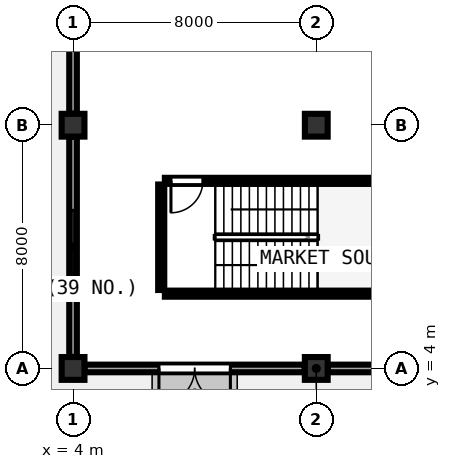
"""IFC4 building model, lengths in metres.
Left out: names, types, materials, properties, quantities, classifications, styles, units other than length and angle.
Written with IfcOpenShell. Run it as: python <this file> out.ifc"""

import sys

from ifc_helpers import new_model, si_unit, direction, frame, frame_2d, origin, origin_2d, place, context, subcontext, project, spatial, rectangle, extrude, element, fill, save


model = new_model("IFC4")
c1 = context("Model", 3, precision=1e-05, world=origin(), true_north=direction((0.0, 1.0)))
c2 = subcontext(c1, "Body", "Model", "MODEL_VIEW")
j1 = project(units=[si_unit("LENGTHUNIT", "METRE"), si_unit("PLANEANGLEUNIT", "RADIAN")], contexts=[c1])
p1 = place(None, origin())
s1 = spatial("IfcSite", under=j1, at=p1, CompositionType="ELEMENT")
p2 = place(p1, origin())
s2 = spatial("IfcBuilding", under=s1, at=p2, CompositionType="ELEMENT")
p3 = place(p2, origin())
s3 = spatial("IfcBuildingStorey", under=s2, at=p3, CompositionType="ELEMENT", Elevation=0.0)
for number, where, z_axis, x_axis in (
    (1, (4.0, 4.0, 0.0), (0.0, 0.0, 1.0), (1.0, 0.0, 0.0)),
    (2, (4.0, 12.0, 0.0), (0.0, 0.0, 1.0), (1.0, 0.0, 0.0)),
    (3, (12.0, 4.0, 0.0), (0.0, 0.0, 1.0), (1.0, 0.0, 0.0)),
    (4, (12.0, 12.0, 0.0), (0.0, 0.0, 1.0), (1.0, 0.0, 0.0)),
):
    element("IfcColumn", number, at=place(p3, frame(where, z_axis=z_axis, x_axis=x_axis)), inside=s3, PredefinedType="COLUMN", context=c2, shape_type="SweptSolid", body=[
        extrude(rectangle(XDim=0.75, YDim=0.75, at=origin_2d()), origin(), (0.0, 0.0, 1.0), 4.5),
    ])
p4 = place(p3, frame((4.38, 4.0, 0.0), z_axis=(0.0, 0.0, 1.0), x_axis=(1.0, 0.0, 0.0)))
e5 = element("IfcWall", 5, at=p4, inside=s3, PredefinedType="SOLIDWALL", context=c2, shape_type="SweptSolid", body=[
    extrude(rectangle(XDim=7.24, YDim=0.25, at=frame_2d((3.62, 0.0))), origin(), (0.0, 0.0, 1.0), 3.42),
])
p5 = place(p4, frame((2.445, 0.0, 0.0)))
e6 = element("IfcOpeningElement", 6, at=p5, cuts=e5, PredefinedType="OPENING", context=c2, shape_type="SweptSolid", body=[
    extrude(rectangle(XDim=2.35, YDim=2.3, at=frame_2d((1.175, 1.15))), frame((0.0, 0.135, 0.0), z_axis=(0.0, -1.0, 0.0), x_axis=(1.0, 0.0, 0.0)), (0.0, 0.0, 1.0), 0.27),
])
for number, where, z_axis, x_axis in (
    (7, (12.38, 4.0, 0.0), (0.0, 0.0, 1.0), (1.0, 0.0, 0.0)),
    (8, (4.0, 19.62, 0.0), (0.0, 0.0, 1.0), (0.0, -1.0, 0.0)),
):
    element("IfcWall", number, at=place(p3, frame(where, z_axis=z_axis, x_axis=x_axis)), inside=s3, PredefinedType="SOLIDWALL", context=c2, shape_type="SweptSolid", body=[
        extrude(rectangle(XDim=7.24, YDim=0.25, at=frame_2d((3.62, 0.0))), origin(), (0.0, 0.0, 1.0), 3.42),
    ])
p6 = place(p3, frame((4.0, 11.62, 0.0), z_axis=(0.0, 0.0, 1.0), x_axis=(0.0, -1.0, 0.0)))
e9 = element("IfcWall", 9, at=p6, inside=s3, PredefinedType="SOLIDWALL", context=c2, shape_type="SweptSolid", body=[
    extrude(rectangle(XDim=7.24, YDim=0.25, at=frame_2d((3.62, 0.0))), origin(), (0.0, 0.0, 1.0), 3.42),
])
p7 = place(p6, frame((2.42, 0.0, 0.95)))
e10 = element("IfcOpeningElement", 10, at=p7, cuts=e9, PredefinedType="OPENING", context=c2, shape_type="SweptSolid", body=[
    extrude(rectangle(XDim=2.4, YDim=1.65, at=frame_2d((1.2, 0.825))), frame((0.0, 0.135, 0.0), z_axis=(0.0, -1.0, 0.0), x_axis=(1.0, 0.0, 0.0)), (0.0, 0.0, 1.0), 0.27),
])
p8 = place(p3, frame((7.02, 6.46, 0.0), z_axis=(0.0, 0.0, 1.0), x_axis=(1.0, 0.0, 0.0)))
e11 = element("IfcWall", 11, at=p8, inside=s3, PredefinedType="SHEAR", context=c2, shape_type="SweptSolid", body=[
    extrude(rectangle(XDim=7.76, YDim=0.2, at=frame_2d((3.88, 0.0))), origin(), (0.0, 0.0, 1.0), 4.24),
])
p9 = place(p3, frame((14.78, 10.17, 0.0), z_axis=(0.0, 0.0, 1.0), x_axis=(-1.0, 0.0, 0.0)))
e12 = element("IfcWall", 12, at=p9, inside=s3, PredefinedType="SHEAR", context=c2, shape_type="SweptSolid", body=[
    extrude(rectangle(XDim=7.76, YDim=0.2, at=frame_2d((3.88, 0.0))), origin(), (0.0, 0.0, 1.0), 4.24),
])
p10 = place(p9, frame((6.51, 0.0, 0.0)))
e13 = element("IfcOpeningElement", 13, at=p10, cuts=e12, PredefinedType="OPENING", context=c2, shape_type="SweptSolid", body=[
    extrude(rectangle(XDim=1.05, YDim=2.1, at=frame_2d((0.525, 1.05))), frame((0.0, 0.11, 0.0), z_axis=(0.0, -1.0, 0.0), x_axis=(1.0, 0.0, 0.0)), (0.0, 0.0, 1.0), 0.22),
])
p11 = place(p3, frame((6.9, 10.05, 0.0), z_axis=(0.0, 0.0, 1.0), x_axis=(0.0, -1.0, 0.0)))
e14 = element("IfcWall", 14, at=p11, inside=s3, PredefinedType="SHEAR", context=c2, shape_type="SweptSolid", body=[
    extrude(rectangle(XDim=3.47, YDim=0.2, at=frame_2d((1.735, 0.0))), origin(), (0.0, 0.0, 1.0), 4.24),
])
p12 = place(p5, frame((2.35, 0.0, 0.0), z_axis=(0.0, 0.0, 1.0), x_axis=(-1.0, 0.0, 0.0)))
e15 = element("IfcDoor", 15, at=p12, inside=s3, OperationType="DOUBLE_DOOR_SINGLE_SWING", PredefinedType="DOOR", context=c2, shape_type="SweptSolid", body=[
    extrude(rectangle(XDim=2.35, YDim=2.3, at=frame_2d((1.175, 1.15))), frame((0.0, 0.025, 0.0), z_axis=(0.0, -1.0, 0.0), x_axis=(1.0, 0.0, 0.0)), (0.0, 0.0, 1.0), 0.05),
])
fill(e6, e15)
p13 = place(p7, origin())
e16 = element("IfcWindow", 16, at=p13, inside=s3, PartitioningType="SINGLE_PANEL", PredefinedType="WINDOW", context=c2, shape_type="SweptSolid", body=[
    extrude(rectangle(XDim=2.4, YDim=1.65, at=frame_2d((1.2, 0.825))), frame((0.0, 0.03, 0.0), z_axis=(0.0, -1.0, 0.0), x_axis=(1.0, 0.0, 0.0)), (0.0, 0.0, 1.0), 0.06),
])
fill(e10, e16)
p14 = place(p10, origin())
e17 = element("IfcDoor", 17, at=p14, inside=s3, OperationType="SINGLE_SWING_RIGHT", PredefinedType="DOOR", context=c2, shape_type="SweptSolid", body=[
    extrude(rectangle(XDim=1.05, YDim=2.1, at=frame_2d((0.525, 1.05))), frame((0.0, 0.025, 0.0), z_axis=(0.0, -1.0, 0.0), x_axis=(1.0, 0.0, 0.0)), (0.0, 0.0, 1.0), 0.05),
])
fill(e13, e17)
save(model, sys.argv[1])
